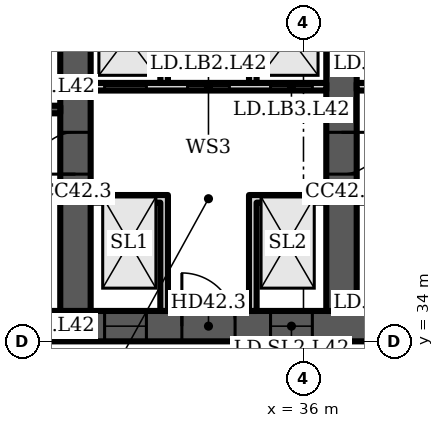
"""IFC4 building model, lengths in metres.
Left out: names, types, materials, properties, quantities, classifications, styles, units other than length and angle.
Written with IfcOpenShell. Run it as: python <this file> out.ifc"""

import sys

from ifc_helpers import new_model, si_unit, direction, frame, frame_2d, origin, place, context, subcontext, project, spatial, polyline, rectangle, outline, extrude, element, fill, save


model = new_model("IFC4")
c1 = context("Model", 3, precision=1e-05, world=origin(), true_north=direction((0.0, 1.0)))
c2 = subcontext(c1, "Body", "Model", "MODEL_VIEW")
j1 = project(units=[si_unit("LENGTHUNIT", "METRE"), si_unit("PLANEANGLEUNIT", "RADIAN")], contexts=[c1])
p1 = place(None, origin())
s1 = spatial("IfcSite", under=j1, at=p1, CompositionType="ELEMENT")
p2 = place(p1, origin())
s2 = spatial("IfcBuilding", under=s1, at=p2, CompositionType="ELEMENT")
p3 = place(p2, frame((0.0, 0.0, 173.5)))
s3 = spatial("IfcBuildingStorey", under=s2, at=p3, CompositionType="ELEMENT", Elevation=173.5)
p4 = place(p3, frame((16.0, 34.4, 0.0), z_axis=(0.0, 0.0, 1.0), x_axis=(1.0, 0.0, 0.0)))
e1 = element("IfcWall", 1, at=p4, inside=s3, PredefinedType="SHEAR", context=c2, shape_type="SweptSolid", body=[
    extrude(rectangle(XDim=42.0, YDim=0.8, at=frame_2d((21.0, 0.0))), origin(), (0.0, 0.0, 1.0), 3.6),
])
p5 = place(p4, frame((3.2, 0.0, 0.0)))
e2 = element("IfcOpeningElement", 2, at=p5, cuts=e1, PredefinedType="OPENING", context=c2, shape_type="SweptSolid", body=[
    extrude(rectangle(XDim=1.0, YDim=2.1, at=frame_2d((0.5, 1.05))), frame((0.0, 0.41, 0.0), z_axis=(0.0, -1.0, 0.0), x_axis=(1.0, 0.0, 0.0)), (0.0, 0.0, 1.0), 0.82),
])
p6 = place(p4, frame((7.65, 0.0, 0.0)))
e3 = element("IfcOpeningElement", 3, at=p6, cuts=e1, PredefinedType="OPENING", context=c2, shape_type="SweptSolid", body=[
    extrude(rectangle(XDim=1.2, YDim=2.1, at=frame_2d((0.6, 1.05))), frame((0.0, 0.41, 0.0), z_axis=(0.0, -1.0, 0.0), x_axis=(1.0, 0.0, 0.0)), (0.0, 0.0, 1.0), 0.82),
])
p7 = place(p4, frame((14.767, 0.0, 0.0)))
e4 = element("IfcOpeningElement", 4, at=p7, cuts=e1, PredefinedType="OPENING", context=c2, shape_type="SweptSolid", body=[
    extrude(rectangle(XDim=1.1, YDim=2.1, at=frame_2d((0.55, 1.05))), frame((0.0, 0.41, 0.0), z_axis=(0.0, -1.0, 0.0), x_axis=(1.0, 0.0, 0.0)), (0.0, 0.0, 1.0), 0.82),
])
p8 = place(p4, frame((19.133, 0.0, 0.0)))
e5 = element("IfcOpeningElement", 5, at=p8, cuts=e1, PredefinedType="OPENING", context=c2, shape_type="SweptSolid", body=[
    extrude(rectangle(XDim=1.1, YDim=2.1, at=frame_2d((0.55, 1.05))), frame((0.0, 0.41, 0.0), z_axis=(0.0, -1.0, 0.0), x_axis=(1.0, 0.0, 0.0)), (0.0, 0.0, 1.0), 0.82),
])
p9 = place(p4, frame((16.8, 0.0, 0.0)))
e6 = element("IfcOpeningElement", 6, at=p9, cuts=e1, PredefinedType="OPENING", context=c2, shape_type="SweptSolid", body=[
    extrude(rectangle(XDim=1.4, YDim=2.1, at=frame_2d((0.7, 1.05))), frame((0.0, 0.41, 0.0), z_axis=(0.0, -1.0, 0.0), x_axis=(1.0, 0.0, 0.0)), (0.0, 0.0, 1.0), 0.82),
])
p10 = place(p4, frame((21.767, 0.0, 0.0)))
e7 = element("IfcOpeningElement", 7, at=p10, cuts=e1, PredefinedType="OPENING", context=c2, shape_type="SweptSolid", body=[
    extrude(rectangle(XDim=1.1, YDim=2.1, at=frame_2d((0.55, 1.05))), frame((0.0, 0.41, 0.0), z_axis=(0.0, -1.0, 0.0), x_axis=(1.0, 0.0, 0.0)), (0.0, 0.0, 1.0), 0.82),
])
p11 = place(p4, frame((23.95, 0.0, 0.0)))
e8 = element("IfcOpeningElement", 8, at=p11, cuts=e1, PredefinedType="OPENING", context=c2, shape_type="SweptSolid", body=[
    extrude(rectangle(XDim=1.1, YDim=2.1, at=frame_2d((0.55, 1.05))), frame((0.0, 0.41, 0.0), z_axis=(0.0, -1.0, 0.0), x_axis=(1.0, 0.0, 0.0)), (0.0, 0.0, 1.0), 0.82),
])
p12 = place(p4, frame((26.133, 0.0, 0.0)))
e9 = element("IfcOpeningElement", 9, at=p12, cuts=e1, PredefinedType="OPENING", context=c2, shape_type="SweptSolid", body=[
    extrude(rectangle(XDim=1.1, YDim=2.1, at=frame_2d((0.55, 1.05))), frame((0.0, 0.41, 0.0), z_axis=(0.0, -1.0, 0.0), x_axis=(1.0, 0.0, 0.0)), (0.0, 0.0, 1.0), 0.82),
])
p13 = place(p4, frame((33.15, 0.0, 0.0)))
e10 = element("IfcOpeningElement", 10, at=p13, cuts=e1, PredefinedType="OPENING", context=c2, shape_type="SweptSolid", body=[
    extrude(rectangle(XDim=1.2, YDim=2.1, at=frame_2d((0.6, 1.05))), frame((0.0, 0.41, 0.0), z_axis=(0.0, -1.0, 0.0), x_axis=(1.0, 0.0, 0.0)), (0.0, 0.0, 1.0), 0.82),
])
p14 = place(p4, frame((35.817, 0.0, 0.0)))
e11 = element("IfcOpeningElement", 11, at=p14, cuts=e1, PredefinedType="OPENING", context=c2, shape_type="SweptSolid", body=[
    extrude(rectangle(XDim=1.0, YDim=2.1, at=frame_2d((0.5, 1.05))), frame((0.0, 0.41, 0.0), z_axis=(0.0, -1.0, 0.0), x_axis=(1.0, 0.0, 0.0)), (0.0, 0.0, 1.0), 0.82),
])
p15 = place(p4, frame((39.95, 0.0, 0.0)))
e12 = element("IfcOpeningElement", 12, at=p15, cuts=e1, PredefinedType="OPENING", context=c2, shape_type="SweptSolid", body=[
    extrude(rectangle(XDim=1.0, YDim=2.1, at=frame_2d((0.5, 1.05))), frame((0.0, 0.41, 0.0), z_axis=(0.0, -1.0, 0.0), x_axis=(1.0, 0.0, 0.0)), (0.0, 0.0, 1.0), 0.82),
])
p16 = place(p4, frame((37.767, 0.0, 0.0)))
e13 = element("IfcOpeningElement", 13, at=p16, cuts=e1, PredefinedType="OPENING", context=c2, shape_type="SweptSolid", body=[
    extrude(rectangle(XDim=1.4, YDim=2.1, at=frame_2d((0.7, 1.05))), frame((0.0, 0.41, 0.0), z_axis=(0.0, -1.0, 0.0), x_axis=(1.0, 0.0, 0.0)), (0.0, 0.0, 1.0), 0.82),
])
p17 = place(p3, frame((30.0, 34.8, 0.0), z_axis=(0.0, 0.0, 1.0), x_axis=(0.0, 1.0, 0.0)))
e14 = element("IfcWall", 14, at=p17, inside=s3, PredefinedType="SHEAR", context=c2, shape_type="SweptSolid", body=[
    extrude(rectangle(XDim=14.374, YDim=0.8, at=frame_2d((7.187, 0.0))), origin(), (0.0, 0.0, 1.0), 3.6),
])
p18 = place(p17, frame((3.6, 0.0, 0.0)))
e15 = element("IfcOpeningElement", 15, at=p18, cuts=e14, PredefinedType="OPENING", context=c2, shape_type="SweptSolid", body=[
    extrude(rectangle(XDim=1.1, YDim=2.1, at=frame_2d((0.55, 1.05))), frame((0.0, 0.41, 0.0), z_axis=(0.0, -1.0, 0.0), x_axis=(1.0, 0.0, 0.0)), (0.0, 0.0, 1.0), 0.82),
])
p19 = place(p3, frame((37.0, 34.8, 0.0), z_axis=(0.0, 0.0, 1.0), x_axis=(0.0, 1.0, 0.0)))
e16 = element("IfcWall", 16, at=p19, inside=s3, PredefinedType="SHEAR", context=c2, shape_type="SweptSolid", body=[
    extrude(rectangle(XDim=14.987, YDim=0.8, at=frame_2d((7.493, 0.0))), origin(), (0.0, 0.0, 1.0), 3.6),
])
p20 = place(p19, frame((11.312, 0.0, 0.0)))
e17 = element("IfcOpeningElement", 17, at=p20, cuts=e16, PredefinedType="OPENING", context=c2, shape_type="SweptSolid", body=[
    extrude(rectangle(XDim=1.0, YDim=2.1, at=frame_2d((0.5, 1.05))), frame((0.0, 0.41, 0.0), z_axis=(0.0, -1.0, 0.0), x_axis=(1.0, 0.0, 0.0)), (0.0, 0.0, 1.0), 0.82),
])
p21 = place(p19, frame((3.6, 0.0, 0.0)))
e18 = element("IfcOpeningElement", 18, at=p21, cuts=e16, PredefinedType="OPENING", context=c2, shape_type="SweptSolid", body=[
    extrude(rectangle(XDim=1.1, YDim=2.1, at=frame_2d((0.55, 1.05))), frame((0.0, 0.41, 0.0), z_axis=(0.0, -1.0, 0.0), x_axis=(1.0, 0.0, 0.0)), (0.0, 0.0, 1.0), 0.82),
])
p22 = place(p3, frame((23.4, 40.1, 0.0), z_axis=(0.0, 0.0, 1.0), x_axis=(1.0, 0.0, 0.0)))
e19 = element("IfcWall", 19, at=p22, inside=s3, PredefinedType="SHEAR", context=c2, shape_type="SweptSolid", body=[
    extrude(rectangle(XDim=6.2, YDim=0.2, at=frame_2d((3.1, 0.0))), origin(), (0.0, 0.0, 1.0), 3.2),
])
p23 = place(p22, frame((3.525, 0.0, 0.0)))
e20 = element("IfcOpeningElement", 20, at=p23, cuts=e19, PredefinedType="OPENING", context=c2, shape_type="SweptSolid", body=[
    extrude(rectangle(XDim=1.2, YDim=2.1, at=frame_2d((0.6, 1.05))), frame((0.0, 0.11, 0.0), z_axis=(0.0, -1.0, 0.0), x_axis=(1.0, 0.0, 0.0)), (0.0, 0.0, 1.0), 0.22),
])
p24 = place(p22, frame((0.575, 0.0, 0.0)))
e21 = element("IfcOpeningElement", 21, at=p24, cuts=e19, PredefinedType="OPENING", context=c2, shape_type="SweptSolid", body=[
    extrude(rectangle(XDim=0.9, YDim=2.1, at=frame_2d((0.45, 1.05))), frame((0.0, 0.11, 0.0), z_axis=(0.0, -1.0, 0.0), x_axis=(1.0, 0.0, 0.0)), (0.0, 0.0, 1.0), 0.22),
])
p25 = place(p3, frame((30.4, 40.7, 0.0), z_axis=(0.0, 0.0, 1.0), x_axis=(1.0, 0.0, 0.0)))
e22 = element("IfcWall", 22, at=p25, inside=s3, PredefinedType="PARTITIONING", context=c2, shape_type="SweptSolid", body=[
    extrude(rectangle(XDim=6.2, YDim=0.2, at=frame_2d((3.1, 0.0))), origin(), (0.0, 0.0, 1.0), 3.2),
])
p26 = place(p25, frame((0.367, 0.0, 0.0)))
e23 = element("IfcOpeningElement", 23, at=p26, cuts=e22, PredefinedType="OPENING", context=c2, shape_type="SweptSolid", body=[
    extrude(rectangle(XDim=1.1, YDim=2.1, at=frame_2d((0.55, 1.05))), frame((0.0, 0.11, 0.0), z_axis=(0.0, -1.0, 0.0), x_axis=(1.0, 0.0, 0.0)), (0.0, 0.0, 1.0), 0.22),
])
p27 = place(p25, frame((2.55, 0.0, 0.0)))
e24 = element("IfcOpeningElement", 24, at=p27, cuts=e22, PredefinedType="OPENING", context=c2, shape_type="SweptSolid", body=[
    extrude(rectangle(XDim=1.1, YDim=2.1, at=frame_2d((0.55, 1.05))), frame((0.0, 0.11, 0.0), z_axis=(0.0, -1.0, 0.0), x_axis=(1.0, 0.0, 0.0)), (0.0, 0.0, 1.0), 0.22),
])
p28 = place(p25, frame((4.733, 0.0, 0.0)))
e25 = element("IfcOpeningElement", 25, at=p28, cuts=e22, PredefinedType="OPENING", context=c2, shape_type="SweptSolid", body=[
    extrude(rectangle(XDim=1.1, YDim=2.1, at=frame_2d((0.55, 1.05))), frame((0.0, 0.11, 0.0), z_axis=(0.0, -1.0, 0.0), x_axis=(1.0, 0.0, 0.0)), (0.0, 0.0, 1.0), 0.22),
])
p29 = place(p3, frame((0.0, 0.0, -0.0)))
e26 = element("IfcWall", 26, at=p29, inside=s3, PredefinedType="PARTITIONING", context=c2, shape_type="SweptSolid", body=[
    extrude(outline(polyline([(32.233, 37.65), (30.4, 37.65), (30.4, 37.85), (32.233, 37.85), (32.433, 37.85), (32.433, 34.8), (32.233, 34.8), (32.233, 37.65)])), origin(), (0.0, 0.0, 1.0), 3.2),
])
p30 = place(p3, frame((0.0, 0.0, -0.0)))
e27 = element("IfcWall", 27, at=p30, inside=s3, PredefinedType="PARTITIONING", context=c2, shape_type="SweptSolid", body=[
    extrude(outline(polyline([(34.567, 37.85), (34.767, 37.85), (36.6, 37.85), (36.6, 37.65), (34.767, 37.65), (34.767, 34.8), (34.567, 34.8), (34.567, 37.85)])), origin(), (0.0, 0.0, 1.0), 3.2),
])
p31 = place(p3, frame((0.0, 0.0, -0.0)))
e28 = element("IfcWall", 28, at=p31, inside=s3, PredefinedType="PARTITIONING", context=c2, shape_type="SweptSolid", body=[
    extrude(outline(polyline([(32.433, 40.8), (32.233, 40.8), (32.233, 43.8), (30.4, 43.8), (30.4, 44.0), (36.6, 44.0), (36.6, 43.8), (34.767, 43.8), (34.767, 40.8), (34.567, 40.8), (34.567, 43.8), (32.433, 43.8), (32.433, 40.8)])), origin(), (0.0, 0.0, 1.0), 3.2),
])
p32 = place(p3, frame((37.4, 40.7, 0.0), z_axis=(0.0, 0.0, 1.0), x_axis=(1.0, 0.0, 0.0)))
e29 = element("IfcWall", 29, at=p32, inside=s3, PredefinedType="PARTITIONING", context=c2, shape_type="SweptSolid", body=[
    extrude(rectangle(XDim=6.2, YDim=0.2, at=frame_2d((3.1, 0.0))), origin(), (0.0, 0.0, 1.0), 3.2),
])
p33 = place(p32, frame((0.367, 0.0, 0.0)))
e30 = element("IfcOpeningElement", 30, at=p33, cuts=e29, PredefinedType="OPENING", context=c2, shape_type="SweptSolid", body=[
    extrude(rectangle(XDim=1.1, YDim=2.1, at=frame_2d((0.55, 1.05))), frame((0.0, 0.11, 0.0), z_axis=(0.0, -1.0, 0.0), x_axis=(1.0, 0.0, 0.0)), (0.0, 0.0, 1.0), 0.22),
])
p34 = place(p32, frame((2.55, 0.0, 0.0)))
e31 = element("IfcOpeningElement", 31, at=p34, cuts=e29, PredefinedType="OPENING", context=c2, shape_type="SweptSolid", body=[
    extrude(rectangle(XDim=1.1, YDim=2.1, at=frame_2d((0.55, 1.05))), frame((0.0, 0.11, 0.0), z_axis=(0.0, -1.0, 0.0), x_axis=(1.0, 0.0, 0.0)), (0.0, 0.0, 1.0), 0.22),
])
p35 = place(p32, frame((4.733, 0.0, 0.0)))
e32 = element("IfcOpeningElement", 32, at=p35, cuts=e29, PredefinedType="OPENING", context=c2, shape_type="SweptSolid", body=[
    extrude(rectangle(XDim=1.1, YDim=2.1, at=frame_2d((0.55, 1.05))), frame((0.0, 0.11, 0.0), z_axis=(0.0, -1.0, 0.0), x_axis=(1.0, 0.0, 0.0)), (0.0, 0.0, 1.0), 0.22),
])
p36 = place(p3, frame((0.0, 0.0, -0.0)))
e33 = element("IfcWall", 33, at=p36, inside=s3, PredefinedType="PARTITIONING", context=c2, shape_type="SweptSolid", body=[
    extrude(outline(polyline([(41.567, 37.1), (39.433, 37.1), (39.433, 34.8), (39.233, 34.8), (39.233, 37.65), (37.4, 37.65), (37.4, 37.85), (39.233, 37.85), (39.433, 37.85), (39.433, 37.3), (41.567, 37.3), (41.567, 37.55), (41.767, 37.55), (43.6, 37.55), (43.6, 37.35), (41.767, 37.35), (41.767, 34.8), (41.567, 34.8), (41.567, 37.1)])), origin(), (0.0, 0.0, 1.0), 3.2),
])
p37 = place(p3, frame((0.0, 0.0, -0.0)))
e34 = element("IfcWall", 34, at=p37, inside=s3, PredefinedType="PARTITIONING", context=c2, shape_type="SweptSolid", body=[
    extrude(outline(polyline([(39.433, 40.8), (39.233, 40.8), (39.233, 43.8), (37.4, 43.8), (37.4, 44.0), (43.6, 44.0), (43.6, 43.8), (41.767, 43.8), (41.767, 40.8), (41.567, 40.8), (41.567, 43.8), (39.433, 43.8), (39.433, 40.8)])), origin(), (0.0, 0.0, 1.0), 3.2),
])
p38 = place(p3, frame((37.0, 30.5, 0.0), z_axis=(0.0, 0.0, 1.0), x_axis=(0.0, 1.0, 0.0)))
e35 = element("IfcWall", 35, at=p38, inside=s3, PredefinedType="PARTITIONING", context=c2, shape_type="SweptSolid", body=[
    extrude(rectangle(XDim=3.5, YDim=0.2, at=frame_2d((1.75, 0.0))), origin(), (0.0, 0.0, 1.0), 3.2),
])
p39 = place(p38, frame((1.2, 0.0, 0.0)))
e36 = element("IfcOpeningElement", 36, at=p39, cuts=e35, PredefinedType="OPENING", context=c2, shape_type="SweptSolid", body=[
    extrude(rectangle(XDim=1.1, YDim=2.1, at=frame_2d((0.55, 1.05))), frame((0.0, 0.11, 0.0), z_axis=(0.0, -1.0, 0.0), x_axis=(1.0, 0.0, 0.0)), (0.0, 0.0, 1.0), 0.22),
])
p40 = place(p7, origin())
e37 = element("IfcDoor", 37, at=p40, inside=s3, OperationType="DOUBLE_DOOR_SLIDING", PredefinedType="DOOR", context=c2, shape_type="SweptSolid", body=[
    extrude(rectangle(XDim=1.1, YDim=2.1, at=frame_2d((0.55, 1.05))), frame((0.0, 0.025, 0.0), z_axis=(0.0, -1.0, 0.0), x_axis=(1.0, 0.0, 0.0)), (0.0, 0.0, 1.0), 0.05),
])
fill(e4, e37)
p41 = place(p8, origin())
e38 = element("IfcDoor", 38, at=p41, inside=s3, OperationType="DOUBLE_DOOR_SLIDING", PredefinedType="DOOR", context=c2, shape_type="SweptSolid", body=[
    extrude(rectangle(XDim=1.1, YDim=2.1, at=frame_2d((0.55, 1.05))), frame((0.0, 0.025, 0.0), z_axis=(0.0, -1.0, 0.0), x_axis=(1.0, 0.0, 0.0)), (0.0, 0.0, 1.0), 0.05),
])
fill(e5, e38)
p42 = place(p9, origin())
e39 = element("IfcDoor", 39, at=p42, inside=s3, OperationType="DOUBLE_DOOR_SINGLE_SWING", PredefinedType="DOOR", context=c2, shape_type="SweptSolid", body=[
    extrude(rectangle(XDim=1.4, YDim=2.1, at=frame_2d((0.7, 1.05))), frame((0.0, 0.025, 0.0), z_axis=(0.0, -1.0, 0.0), x_axis=(1.0, 0.0, 0.0)), (0.0, 0.0, 1.0), 0.05),
])
fill(e6, e39)
p43 = place(p26, origin())
e40 = element("IfcDoor", 40, at=p43, inside=s3, OperationType="DOUBLE_DOOR_SLIDING", PredefinedType="DOOR", context=c2, shape_type="SweptSolid", body=[
    extrude(rectangle(XDim=1.1, YDim=2.1, at=frame_2d((0.55, 1.05))), frame((0.0, 0.025, 0.0), z_axis=(0.0, -1.0, 0.0), x_axis=(1.0, 0.0, 0.0)), (0.0, 0.0, 1.0), 0.05),
])
fill(e23, e40)
p44 = place(p27, origin())
e41 = element("IfcDoor", 41, at=p44, inside=s3, OperationType="DOUBLE_DOOR_SLIDING", PredefinedType="DOOR", context=c2, shape_type="SweptSolid", body=[
    extrude(rectangle(XDim=1.1, YDim=2.1, at=frame_2d((0.55, 1.05))), frame((0.0, 0.025, 0.0), z_axis=(0.0, -1.0, 0.0), x_axis=(1.0, 0.0, 0.0)), (0.0, 0.0, 1.0), 0.05),
])
fill(e24, e41)
p45 = place(p28, origin())
e42 = element("IfcDoor", 42, at=p45, inside=s3, OperationType="DOUBLE_DOOR_SLIDING", PredefinedType="DOOR", context=c2, shape_type="SweptSolid", body=[
    extrude(rectangle(XDim=1.1, YDim=2.1, at=frame_2d((0.55, 1.05))), frame((0.0, 0.025, 0.0), z_axis=(0.0, -1.0, 0.0), x_axis=(1.0, 0.0, 0.0)), (0.0, 0.0, 1.0), 0.05),
])
fill(e25, e42)
p46 = place(p18, origin())
e43 = element("IfcDoor", 43, at=p46, inside=s3, OperationType="SINGLE_SWING_LEFT", PredefinedType="DOOR", context=c2, shape_type="SweptSolid", body=[
    extrude(rectangle(XDim=1.1, YDim=2.1, at=frame_2d((0.55, 1.05))), frame((0.0, 0.025, 0.0), z_axis=(0.0, -1.0, 0.0), x_axis=(1.0, 0.0, 0.0)), (0.0, 0.0, 1.0), 0.05),
])
fill(e15, e43)
p47 = place(p21, origin())
e44 = element("IfcDoor", 44, at=p47, inside=s3, OperationType="SINGLE_SWING_RIGHT", PredefinedType="DOOR", context=c2, shape_type="SweptSolid", body=[
    extrude(rectangle(XDim=1.1, YDim=2.1, at=frame_2d((0.55, 1.05))), frame((0.0, 0.025, 0.0), z_axis=(0.0, -1.0, 0.0), x_axis=(1.0, 0.0, 0.0)), (0.0, 0.0, 1.0), 0.05),
])
fill(e18, e44)
save(model, sys.argv[1])
